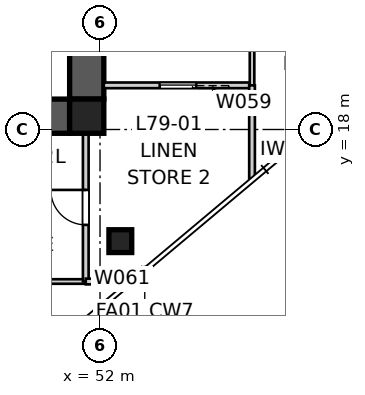
"""IFC4 building model, lengths in metres.
Left out: names, types, materials, properties, quantities, classifications, styles, units other than length and angle.
Written with IfcOpenShell. Run it as: python <this file> out.ifc"""

import sys

from ifc_helpers import new_model, si_unit, direction, frame, frame_2d, origin, origin_2d, place, context, subcontext, project, spatial, polyline, rectangle, outline, extrude, element, fill, save


model = new_model("IFC4")
c1 = context("Model", 3, precision=1e-05, world=origin(), true_north=direction((0.0, 1.0)))
c2 = subcontext(c1, "Body", "Model", "MODEL_VIEW")
j1 = project(units=[si_unit("LENGTHUNIT", "METRE"), si_unit("PLANEANGLEUNIT", "RADIAN")], contexts=[c1])
p1 = place(None, origin())
s1 = spatial("IfcSite", under=j1, at=p1, CompositionType="ELEMENT")
p2 = place(p1, origin())
s2 = spatial("IfcBuilding", under=s1, at=p2, CompositionType="ELEMENT")
p3 = place(p2, frame((0.0, 0.0, 286.2)))
s3 = spatial("IfcBuildingStorey", under=s2, at=p3, CompositionType="ELEMENT", Elevation=286.2)
p4 = place(p3, frame((51.2, 18.35, 0.0), z_axis=(0.0, 0.0, 1.0), x_axis=(-1.0, 0.0, 0.0)))
e1 = element("IfcWall", 1, at=p4, inside=s3, PredefinedType="SHEAR", context=c2, shape_type="SweptSolid", body=[
    extrude(outline(polyline([(0.0, -0.45), (22.4, -0.45), (22.4, -0.025), (22.85, -0.025), (22.85, 0.025), (22.4, 0.025), (22.4, 0.45), (0.0, 0.45), (0.0, 0.025), (-0.45, 0.025), (-0.45, -0.025), (0.0, -0.025), (0.0, -0.45)])), origin(), (0.0, 0.0, 1.0), 3.4),
])
p5 = place(p3, frame((51.65, 18.8, 0.0), z_axis=(0.0, 0.0, 1.0), x_axis=(0.0, 1.0, 0.0)))
e2 = element("IfcWall", 2, at=p5, inside=s3, PredefinedType="SHEAR", context=c2, shape_type="SweptSolid", body=[
    extrude(outline(polyline([(0.0, -0.45), (22.4, -0.45), (22.4, -0.025), (22.85, -0.025), (22.85, 0.025), (22.4, 0.025), (22.4, 0.45), (0.0, 0.45), (0.0, 0.025), (-0.45, 0.025), (-0.45, -0.025), (0.0, -0.025), (0.0, -0.45)])), origin(), (0.0, 0.0, 1.0), 3.4),
])
p6 = place(p5, frame((11.14, 0.0, 0.0)))
e3 = element("IfcOpeningElement", 3, at=p6, cuts=e2, PredefinedType="OPENING", context=c2, shape_type="SweptSolid", body=[
    extrude(rectangle(XDim=1.02, YDim=2.4, at=frame_2d((0.51, 1.2))), frame((0.0, 0.46, 0.0), z_axis=(0.0, -1.0, 0.0), x_axis=(1.0, 0.0, 0.0)), (0.0, 0.0, 1.0), 0.92),
])
p7 = place(p3, frame((51.65, 18.35, 0.0), z_axis=(0.0, 0.0, 1.0), x_axis=(1.0, 0.0, 0.0)))
e4 = element("IfcColumn", 4, at=p7, inside=s3, PredefinedType="COLUMN", context=c2, shape_type="SweptSolid", body=[
    extrude(rectangle(XDim=0.9, YDim=0.9, at=origin_2d()), origin(), (0.0, 0.0, 1.0), 3.4),
])
p8 = place(p3, frame((52.534, 15.062, 0.0), z_axis=(0.0, 0.0, 1.0), x_axis=(1.0, 0.0, 0.0)))
e5 = element("IfcColumn", 5, at=p8, inside=s3, PredefinedType="COLUMN", context=c2, shape_type="SweptSolid", body=[
    extrude(rectangle(XDim=0.6, YDim=0.6, at=origin_2d()), origin(), (0.0, 0.0, 1.0), 3.4),
])
p9 = place(p3, frame((51.625, 14.0, 0.0), z_axis=(0.0, 0.0, 1.0), x_axis=(-1.0, 0.0, 0.0)))
e6 = element("IfcWall", 6, at=p9, inside=s3, PredefinedType="PARTITIONING", context=c2, shape_type="SweptSolid", body=[
    extrude(rectangle(XDim=17.067, YDim=0.12, at=frame_2d((8.533, 0.0))), origin(), (0.0, 0.0, 1.0), 2.55),
])
p10 = place(p9, frame((2.702, 0.0, 0.0)))
e7 = element("IfcOpeningElement", 7, at=p10, cuts=e6, PredefinedType="OPENING", context=c2, shape_type="SweptSolid", body=[
    extrude(rectangle(XDim=0.92, YDim=2.34, at=frame_2d((0.46, 1.17))), frame((0.0, 0.07, 0.0), z_axis=(0.0, -1.0, 0.0), x_axis=(1.0, 0.0, 0.0)), (0.0, 0.0, 1.0), 0.14),
])
p11 = place(p9, frame((11.4, 0.0, 0.0)))
e8 = element("IfcOpeningElement", 8, at=p11, cuts=e6, PredefinedType="OPENING", context=c2, shape_type="SweptSolid", body=[
    extrude(rectangle(XDim=0.92, YDim=2.34, at=frame_2d((0.46, 1.17))), frame((0.0, 0.07, 0.0), z_axis=(0.0, -1.0, 0.0), x_axis=(1.0, 0.0, 0.0)), (0.0, 0.0, 1.0), 0.14),
])
p12 = place(p9, frame((14.544, 0.0, 0.0)))
e9 = element("IfcOpeningElement", 9, at=p12, cuts=e6, PredefinedType="OPENING", context=c2, shape_type="SweptSolid", body=[
    extrude(rectangle(XDim=0.96, YDim=2.1, at=frame_2d((0.48, 1.05))), frame((0.0, 0.07, 0.0), z_axis=(0.0, -1.0, 0.0), x_axis=(1.0, 0.0, 0.0)), (0.0, 0.0, 1.0), 0.14),
])
p13 = place(p3, frame((56.0, 19.162, 0.0), z_axis=(0.0, 0.0, 1.0), x_axis=(-1.0, 0.0, 0.0)))
e10 = element("IfcWall", 10, at=p13, inside=s3, PredefinedType="SOLIDWALL", context=c2, shape_type="SweptSolid", body=[
    extrude(rectangle(XDim=3.9, YDim=0.15, at=frame_2d((1.95, 0.0))), origin(), (0.0, 0.0, 1.0), 3.25),
])
p14 = place(p13, frame((1.47, 0.0, 0.0)))
e11 = element("IfcOpeningElement", 11, at=p14, cuts=e10, PredefinedType="OPENING", context=c2, shape_type="SweptSolid", body=[
    extrude(rectangle(XDim=0.96, YDim=2.1, at=frame_2d((0.48, 1.05))), frame((0.0, 0.085, 0.0), z_axis=(0.0, -1.0, 0.0), x_axis=(1.0, 0.0, 0.0)), (0.0, 0.0, 1.0), 0.17),
])
p15 = place(p3, frame((56.0, 23.681, 0.0), z_axis=(0.0, 0.0, 1.0), x_axis=(0.0, -1.0, 0.0)))
e12 = element("IfcWall", 12, at=p15, inside=s3, PredefinedType="PARTITIONING", context=c2, shape_type="SweptSolid", body=[
    extrude(rectangle(XDim=4.519, YDim=0.12, at=frame_2d((2.26, 0.0))), origin(), (0.0, 0.0, 1.0), 2.55),
])
p16 = place(p15, frame((1.78, 0.0, 0.0)))
e13 = element("IfcOpeningElement", 13, at=p16, cuts=e12, PredefinedType="OPENING", context=c2, shape_type="SweptSolid", body=[
    extrude(rectangle(XDim=0.96, YDim=2.1, at=frame_2d((0.48, 1.05))), frame((0.0, 0.07, 0.0), z_axis=(0.0, -1.0, 0.0), x_axis=(1.0, 0.0, 0.0)), (0.0, 0.0, 1.0), 0.14),
])
p17 = place(p3, frame((51.625, 14.0, 0.0), z_axis=(0.0, 0.0, 1.0), x_axis=(0.0, 1.0, 0.0)))
e14 = element("IfcWall", 14, at=p17, inside=s3, PredefinedType="SOLIDWALL", context=c2, shape_type="SweptSolid", body=[
    extrude(rectangle(XDim=3.9, YDim=0.15, at=frame_2d((1.95, 0.0))), origin(), (0.0, 0.0, 1.0), 3.25),
])
p18 = place(p17, frame((1.49, 0.0, 0.0)))
e15 = element("IfcOpeningElement", 15, at=p18, cuts=e14, PredefinedType="OPENING", context=c2, shape_type="SweptSolid", body=[
    extrude(rectangle(XDim=0.92, YDim=2.1, at=frame_2d((0.46, 1.05))), frame((0.0, 0.085, 0.0), z_axis=(0.0, -1.0, 0.0), x_axis=(1.0, 0.0, 0.0)), (0.0, 0.0, 1.0), 0.17),
])
p19 = place(p3, frame((52.762, 14.0, 0.0), z_axis=(0.0, 0.0, 1.0), x_axis=(-1.0, 0.0, 0.0)))
e16 = element("IfcWall", 16, at=p19, inside=s3, PredefinedType="SOLIDWALL", context=c2, shape_type="SweptSolid", body=[
    extrude(rectangle(XDim=1.137, YDim=0.15, at=frame_2d((0.569, 0.0))), origin(), (0.0, 0.0, 1.0), 3.25),
])
p20 = place(p3, frame((56.0, 19.162, 0.0), z_axis=(0.0, 0.0, 1.0), x_axis=(0.0, -1.0, 0.0)))
e17 = element("IfcWall", 17, at=p20, inside=s3, PredefinedType="SOLIDWALL", context=c2, shape_type="SweptSolid", body=[
    extrude(rectangle(XDim=2.445, YDim=0.15, at=frame_2d((1.222, 0.0))), origin(), (0.0, 0.0, 1.0), 3.25),
])
p21 = place(p3, frame((59.816, 19.919, 0.0), z_axis=(0.0, 0.0, 1.0), x_axis=(-0.642773197476, 0.766056536168, 0.0)))
e18 = element("IfcWall", 18, at=p21, inside=s3, PredefinedType="PARTITIONING", context=c2, shape_type="SweptSolid", body=[
    extrude(rectangle(XDim=5.4, YDim=0.12, at=frame_2d((2.7, 0.0))), origin(), (0.0, 0.0, 1.0), 3.25),
])
p22 = place(p3, frame((51.625, 17.9, 0.0), z_axis=(0.0, 0.0, 1.0), x_axis=(0.027925096799, 0.999610018442, 0.0)))
e19 = element("IfcWall", 19, at=p22, inside=s3, PredefinedType="SOLIDWALL", context=c2, shape_type="SweptSolid", body=[
    extrude(rectangle(XDim=0.9, YDim=0.15, at=frame_2d((0.45, 0.0))), origin(), (0.0, 0.0, 1.0), 3.25),
])
p23 = place(p14, origin())
e20 = element("IfcDoor", 20, at=p23, inside=s3, OperationType="SLIDING_TO_LEFT", PredefinedType="DOOR", context=c2, shape_type="SweptSolid", body=[
    extrude(rectangle(XDim=0.96, YDim=2.1, at=frame_2d((0.48, 1.05))), frame((0.0, 0.025, 0.0), z_axis=(0.0, -1.0, 0.0), x_axis=(1.0, 0.0, 0.0)), (0.0, 0.0, 1.0), 0.05),
])
fill(e11, e20)
p24 = place(p18, origin())
e21 = element("IfcDoor", 21, at=p24, inside=s3, OperationType="SINGLE_SWING_RIGHT", PredefinedType="DOOR", context=c2, shape_type="SweptSolid", body=[
    extrude(rectangle(XDim=0.92, YDim=2.1, at=frame_2d((0.46, 1.05))), frame((0.0, 0.025, 0.0), z_axis=(0.0, -1.0, 0.0), x_axis=(1.0, 0.0, 0.0)), (0.0, 0.0, 1.0), 0.05),
])
fill(e15, e21)
save(model, sys.argv[1])
